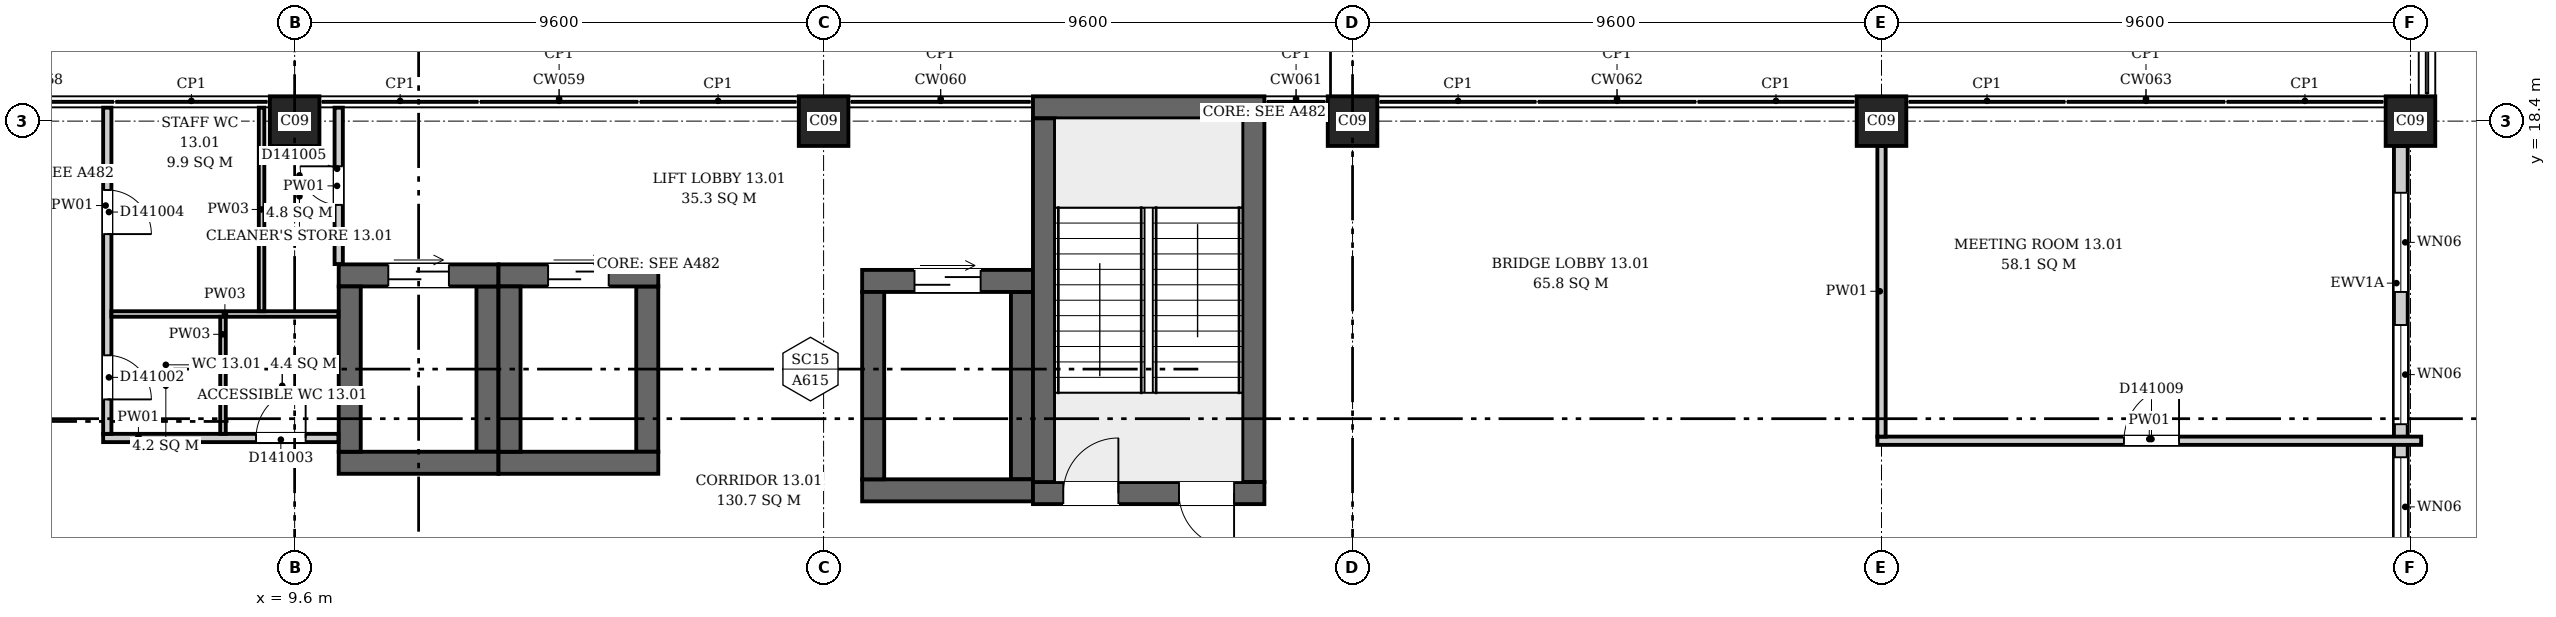
"""IFC4 building model, lengths in metres.
Left out: names, types, materials, properties, quantities, classifications, styles, units other than length and angle.
Written with IfcOpenShell. Run it as: python <this file> out.ifc"""

import sys

from ifc_helpers import new_model, si_unit, direction, frame, frame_2d, origin, origin_2d, place, context, subcontext, project, spatial, rectangle, extrude, element, fill, save


model = new_model("IFC4")
c1 = context("Model", 3, precision=1e-05, world=origin(), true_north=direction((0.0, 1.0)))
c2 = subcontext(c1, "Body", "Model", "MODEL_VIEW")
j1 = project(units=[si_unit("LENGTHUNIT", "METRE"), si_unit("PLANEANGLEUNIT", "RADIAN")], contexts=[c1])
p1 = place(None, origin())
s1 = spatial("IfcSite", under=j1, at=p1, CompositionType="ELEMENT")
p2 = place(p1, origin())
s2 = spatial("IfcBuilding", under=s1, at=p2, CompositionType="ELEMENT")
p3 = place(p2, frame((0.0, 0.0, 65.5)))
s3 = spatial("IfcBuildingStorey", under=s2, at=p3, CompositionType="ELEMENT", Elevation=65.5)
p4 = place(p3, frame((23.0, 11.65, 0.0), z_axis=(0.0, 0.0, 1.0), x_axis=(1.0, 0.0, 0.0)))
e1 = element("IfcWall", 1, at=p4, inside=s3, PredefinedType="SHEAR", context=c2, shape_type="SweptSolid", body=[
    extrude(rectangle(XDim=4.2, YDim=0.4, at=frame_2d((2.1, 0.0))), origin(), (0.0, 0.0, 1.0), 4.2),
])
p5 = place(p4, frame((0.55, 0.0, 0.0)))
e2 = element("IfcOpeningElement", 2, at=p5, cuts=e1, PredefinedType="OPENING", context=c2, shape_type="SweptSolid", body=[
    extrude(rectangle(XDim=1.0, YDim=2.1, at=frame_2d((0.5, 1.05))), frame((0.0, 0.21, 0.0), z_axis=(0.0, -1.0, 0.0), x_axis=(1.0, 0.0, 0.0)), (0.0, 0.0, 1.0), 0.42),
])
p6 = place(p4, frame((2.65, 0.0, 0.0)))
e3 = element("IfcOpeningElement", 3, at=p6, cuts=e1, PredefinedType="OPENING", context=c2, shape_type="SweptSolid", body=[
    extrude(rectangle(XDim=1.0, YDim=2.1, at=frame_2d((0.5, 1.05))), frame((0.0, 0.21, 0.0), z_axis=(0.0, -1.0, 0.0), x_axis=(1.0, 0.0, 0.0)), (0.0, 0.0, 1.0), 0.42),
])
p7 = place(p3, frame((23.0, 18.65, 0.0), z_axis=(0.0, 0.0, 1.0), x_axis=(1.0, 0.0, 0.0)))
e4 = element("IfcWall", 4, at=p7, inside=s3, PredefinedType="SHEAR", context=c2, shape_type="SweptSolid", body=[
    extrude(rectangle(XDim=4.2, YDim=0.4, at=frame_2d((2.1, 0.0))), origin(), (0.0, 0.0, 1.0), 4.2),
])
for number, where, z_axis, x_axis in (
    (5, (23.2, 11.85, 0.0), (0.0, 0.0, 1.0), (0.0, 1.0, 0.0)),
    (6, (27.0, 11.85, 0.0), (0.0, 0.0, 1.0), (0.0, 1.0, 0.0)),
):
    element("IfcWall", number, at=place(p3, frame(where, z_axis=z_axis, x_axis=x_axis)), inside=s3, PredefinedType="SHEAR", context=c2, shape_type="SweptSolid", body=[
        extrude(rectangle(XDim=6.6, YDim=0.4, at=frame_2d((3.3, 0.0))), origin(), (0.0, 0.0, 1.0), 4.2),
    ])
p8 = place(p3, frame((10.4, 12.2, 0.0), z_axis=(0.0, 0.0, 1.0), x_axis=(1.0, 0.0, 0.0)))
e7 = element("IfcWall", 7, at=p8, inside=s3, PredefinedType="SHEAR", context=c2, shape_type="SweptSolid", body=[
    extrude(rectangle(XDim=2.9, YDim=0.4, at=frame_2d((1.45, 0.0))), origin(), (0.0, 0.0, 1.0), 4.2),
])
p9 = place(p3, frame((10.4, 15.6, 0.0), z_axis=(0.0, 0.0, 1.0), x_axis=(1.0, 0.0, 0.0)))
e8 = element("IfcWall", 8, at=p9, inside=s3, PredefinedType="SHEAR", context=c2, shape_type="SweptSolid", body=[
    extrude(rectangle(XDim=2.9, YDim=0.4, at=frame_2d((1.45, 0.0))), origin(), (0.0, 0.0, 1.0), 4.2),
])
p10 = place(p9, frame((0.9, 0.0, 0.0)))
e9 = element("IfcOpeningElement", 9, at=p10, cuts=e8, PredefinedType="OPENING", context=c2, shape_type="SweptSolid", body=[
    extrude(rectangle(XDim=1.1, YDim=2.1, at=frame_2d((0.55, 1.05))), frame((0.0, 0.21, 0.0), z_axis=(0.0, -1.0, 0.0), x_axis=(1.0, 0.0, 0.0)), (0.0, 0.0, 1.0), 0.42),
])
for number, where, z_axis, x_axis in (
    (10, (10.6, 12.4, 0.0), (0.0, 0.0, 1.0), (0.0, 1.0, 0.0)),
    (11, (13.1, 12.4, 0.0), (0.0, 0.0, 1.0), (0.0, 1.0, 0.0)),
):
    element("IfcWall", number, at=place(p3, frame(where, z_axis=z_axis, x_axis=x_axis)), inside=s3, PredefinedType="SHEAR", context=c2, shape_type="SweptSolid", body=[
        extrude(rectangle(XDim=3.0, YDim=0.4, at=frame_2d((1.5, 0.0))), origin(), (0.0, 0.0, 1.0), 4.2),
    ])
p11 = place(p3, frame((13.3, 12.2, 0.0), z_axis=(0.0, 0.0, 1.0), x_axis=(1.0, 0.0, 0.0)))
e12 = element("IfcWall", 12, at=p11, inside=s3, PredefinedType="SHEAR", context=c2, shape_type="SweptSolid", body=[
    extrude(rectangle(XDim=2.9, YDim=0.4, at=frame_2d((1.45, 0.0))), origin(), (0.0, 0.0, 1.0), 4.2),
])
p12 = place(p3, frame((13.3, 15.6, 0.0), z_axis=(0.0, 0.0, 1.0), x_axis=(1.0, 0.0, 0.0)))
e13 = element("IfcWall", 13, at=p12, inside=s3, PredefinedType="SHEAR", context=c2, shape_type="SweptSolid", body=[
    extrude(rectangle(XDim=2.9, YDim=0.4, at=frame_2d((1.45, 0.0))), origin(), (0.0, 0.0, 1.0), 4.2),
])
p13 = place(p12, frame((0.9, 0.0, 0.0)))
e14 = element("IfcOpeningElement", 14, at=p13, cuts=e13, PredefinedType="OPENING", context=c2, shape_type="SweptSolid", body=[
    extrude(rectangle(XDim=1.1, YDim=2.1, at=frame_2d((0.55, 1.05))), frame((0.0, 0.21, 0.0), z_axis=(0.0, -1.0, 0.0), x_axis=(1.0, 0.0, 0.0)), (0.0, 0.0, 1.0), 0.42),
])
for number, where, z_axis, x_axis in (
    (15, (13.5, 12.4, 0.0), (0.0, 0.0, 1.0), (0.0, 1.0, 0.0)),
    (16, (16.0, 12.4, 0.0), (0.0, 0.0, 1.0), (0.0, 1.0, 0.0)),
):
    element("IfcWall", number, at=place(p3, frame(where, z_axis=z_axis, x_axis=x_axis)), inside=s3, PredefinedType="SHEAR", context=c2, shape_type="SweptSolid", body=[
        extrude(rectangle(XDim=3.0, YDim=0.4, at=frame_2d((1.5, 0.0))), origin(), (0.0, 0.0, 1.0), 4.2),
    ])
p14 = place(p3, frame((19.9, 11.7, 0.0), z_axis=(0.0, 0.0, 1.0), x_axis=(1.0, 0.0, 0.0)))
e17 = element("IfcWall", 17, at=p14, inside=s3, PredefinedType="SHEAR", context=c2, shape_type="SweptSolid", body=[
    extrude(rectangle(XDim=3.1, YDim=0.4, at=frame_2d((1.55, 0.0))), origin(), (0.0, 0.0, 1.0), 4.2),
])
p15 = place(p3, frame((19.9, 15.5, 0.0), z_axis=(0.0, 0.0, 1.0), x_axis=(1.0, 0.0, 0.0)))
e18 = element("IfcWall", 18, at=p15, inside=s3, PredefinedType="SHEAR", context=c2, shape_type="SweptSolid", body=[
    extrude(rectangle(XDim=3.1, YDim=0.4, at=frame_2d((1.55, 0.0))), origin(), (0.0, 0.0, 1.0), 4.2),
])
p16 = place(p15, frame((0.95, 0.0, 0.0)))
e19 = element("IfcOpeningElement", 19, at=p16, cuts=e18, PredefinedType="OPENING", context=c2, shape_type="SweptSolid", body=[
    extrude(rectangle(XDim=1.2, YDim=2.1, at=frame_2d((0.6, 1.05))), frame((0.0, 0.21, 0.0), z_axis=(0.0, -1.0, 0.0), x_axis=(1.0, 0.0, 0.0)), (0.0, 0.0, 1.0), 0.42),
])
for number, where, z_axis, x_axis in (
    (20, (20.1, 11.9, 0.0), (0.0, 0.0, 1.0), (0.0, 1.0, 0.0)),
    (21, (22.8, 11.9, 0.0), (0.0, 0.0, 1.0), (0.0, 1.0, 0.0)),
):
    element("IfcWall", number, at=place(p3, frame(where, z_axis=z_axis, x_axis=x_axis)), inside=s3, PredefinedType="SHEAR", context=c2, shape_type="SweptSolid", body=[
        extrude(rectangle(XDim=3.4, YDim=0.4, at=frame_2d((1.7, 0.0))), origin(), (0.0, 0.0, 1.0), 4.2),
    ])
for number, where, z_axis, x_axis in (
    (22, (9.6, 18.4, 0.0), (0.0, 0.0, 1.0), (1.0, 0.0, 0.0)),
    (23, (19.2, 18.4, 0.0), (0.0, 0.0, 1.0), (1.0, 0.0, 0.0)),
    (24, (28.8, 18.4, 0.0), (0.0, 0.0, 1.0), (1.0, 0.0, 0.0)),
    (25, (38.4, 18.4, 0.0), (0.0, 0.0, 1.0), (1.0, 0.0, 0.0)),
    (26, (48.0, 18.4, 0.0), (0.0, 0.0, 1.0), (1.0, 0.0, 0.0)),
):
    element("IfcColumn", number, at=place(p3, frame(where, z_axis=z_axis, x_axis=x_axis)), inside=s3, PredefinedType="COLUMN", context=c2, shape_type="SweptSolid", body=[
        extrude(rectangle(XDim=0.9, YDim=0.9, at=origin_2d()), origin(), (0.0, 0.0, 1.0), 4.2),
    ])
p17 = place(p3, frame((47.825, 9.65, 0.0), z_axis=(0.0, 0.0, 1.0), x_axis=(0.0, 1.0, 0.0)))
e27 = element("IfcWall", 27, at=p17, inside=s3, PredefinedType="ELEMENTEDWALL", context=c2, shape_type="SweptSolid", body=[
    extrude(rectangle(XDim=8.3, YDim=0.25, at=frame_2d((4.15, 0.0))), origin(), (0.0, 0.0, 1.0), 3.3),
])
p18 = place(p17, frame((0.85, 0.0, 0.6)))
e28 = element("IfcOpeningElement", 28, at=p18, cuts=e27, PredefinedType="OPENING", context=c2, shape_type="SweptSolid", body=[
    extrude(rectangle(XDim=1.8, YDim=2.6, at=frame_2d((0.9, 1.3))), frame((0.0, 0.135, 0.0), z_axis=(0.0, -1.0, 0.0), x_axis=(1.0, 0.0, 0.0)), (0.0, 0.0, 1.0), 0.27),
])
p19 = place(p17, frame((3.25, 0.0, 0.6)))
e29 = element("IfcOpeningElement", 29, at=p19, cuts=e27, PredefinedType="OPENING", context=c2, shape_type="SweptSolid", body=[
    extrude(rectangle(XDim=1.8, YDim=2.6, at=frame_2d((0.9, 1.3))), frame((0.0, 0.135, 0.0), z_axis=(0.0, -1.0, 0.0), x_axis=(1.0, 0.0, 0.0)), (0.0, 0.0, 1.0), 0.27),
])
p20 = place(p17, frame((5.65, 0.0, 0.6)))
e30 = element("IfcOpeningElement", 30, at=p20, cuts=e27, PredefinedType="OPENING", context=c2, shape_type="SweptSolid", body=[
    extrude(rectangle(XDim=1.8, YDim=2.6, at=frame_2d((0.9, 1.3))), frame((0.0, 0.135, 0.0), z_axis=(0.0, -1.0, 0.0), x_axis=(1.0, 0.0, 0.0)), (0.0, 0.0, 1.0), 0.27),
])
p21 = place(p3, frame((6.125, 12.65, 0.0), z_axis=(0.0, 0.0, 1.0), x_axis=(1.0, 0.0, 0.0)))
e31 = element("IfcWall", 31, at=p21, inside=s3, PredefinedType="PARTITIONING", context=c2, shape_type="SweptSolid", body=[
    extrude(rectangle(XDim=4.269, YDim=0.15, at=frame_2d((2.135, 0.0))), origin(), (0.0, 0.0, 1.0), 3.9),
])
p22 = place(p21, frame((2.775, 0.0, 0.0)))
e32 = element("IfcOpeningElement", 32, at=p22, cuts=e31, PredefinedType="OPENING", context=c2, shape_type="SweptSolid", body=[
    extrude(rectangle(XDim=0.9, YDim=2.1, at=frame_2d((0.45, 1.05))), frame((0.0, 0.085, 0.0), z_axis=(0.0, -1.0, 0.0), x_axis=(1.0, 0.0, 0.0)), (0.0, 0.0, 1.0), 0.17),
])
p23 = place(p3, frame((6.2, 12.725, 0.0), z_axis=(0.0, 0.0, 1.0), x_axis=(0.0, 1.0, 0.0)))
e33 = element("IfcWall", 33, at=p23, inside=s3, PredefinedType="PARTITIONING", context=c2, shape_type="SweptSolid", body=[
    extrude(rectangle(XDim=5.919, YDim=0.15, at=frame_2d((2.959, 0.0))), origin(), (0.0, 0.0, 1.0), 3.9),
])
p24 = place(p23, frame((0.625, 0.0, 0.0)))
e34 = element("IfcOpeningElement", 34, at=p24, cuts=e33, PredefinedType="OPENING", context=c2, shape_type="SweptSolid", body=[
    extrude(rectangle(XDim=0.8, YDim=2.1, at=frame_2d((0.4, 1.05))), frame((0.0, 0.085, 0.0), z_axis=(0.0, -1.0, 0.0), x_axis=(1.0, 0.0, 0.0)), (0.0, 0.0, 1.0), 0.17),
])
p25 = place(p23, frame((3.625, 0.0, 0.0)))
e35 = element("IfcOpeningElement", 35, at=p25, cuts=e33, PredefinedType="OPENING", context=c2, shape_type="SweptSolid", body=[
    extrude(rectangle(XDim=0.8, YDim=2.1, at=frame_2d((0.4, 1.05))), frame((0.0, 0.085, 0.0), z_axis=(0.0, -1.0, 0.0), x_axis=(1.0, 0.0, 0.0)), (0.0, 0.0, 1.0), 0.17),
])
p26 = place(p3, frame((6.275, 14.9, 0.0), z_axis=(0.0, 0.0, 1.0), x_axis=(1.0, 0.0, 0.0)))
e36 = element("IfcWall", 36, at=p26, inside=s3, PredefinedType="PARTITIONING", context=c2, shape_type="SweptSolid", body=[
    extrude(rectangle(XDim=4.119, YDim=0.1, at=frame_2d((2.06, 0.0))), origin(), (0.0, 0.0, 1.0), 3.9),
])
p27 = place(p3, frame((8.3, 12.725, 0.0), z_axis=(0.0, 0.0, 1.0), x_axis=(0.0, 1.0, 0.0)))
e37 = element("IfcWall", 37, at=p27, inside=s3, PredefinedType="PARTITIONING", context=c2, shape_type="SweptSolid", body=[
    extrude(rectangle(XDim=2.125, YDim=0.1, at=frame_2d((1.062, 0.0))), origin(), (0.0, 0.0, 1.0), 3.9),
])
p28 = place(p3, frame((9.0, 14.95, 0.0), z_axis=(0.0, 0.0, 1.0), x_axis=(0.0, 1.0, 0.0)))
e38 = element("IfcWall", 38, at=p28, inside=s3, PredefinedType="PARTITIONING", context=c2, shape_type="SweptSolid", body=[
    extrude(rectangle(XDim=3.694, YDim=0.1, at=frame_2d((1.847, 0.0))), origin(), (0.0, 0.0, 1.0), 3.9),
])
p29 = place(p3, frame((10.4, 15.806, 0.0), z_axis=(0.0, 0.0, 1.0), x_axis=(0.0, 1.0, 0.0)))
e39 = element("IfcWall", 39, at=p29, inside=s3, PredefinedType="PARTITIONING", context=c2, shape_type="SweptSolid", body=[
    extrude(rectangle(XDim=2.838, YDim=0.15, at=frame_2d((1.419, 0.0))), origin(), (0.0, 0.0, 1.0), 3.9),
])
p30 = place(p29, frame((1.074, 0.0, 0.0)))
e40 = element("IfcOpeningElement", 40, at=p30, cuts=e39, PredefinedType="OPENING", context=c2, shape_type="SweptSolid", body=[
    extrude(rectangle(XDim=0.7, YDim=2.1, at=frame_2d((0.35, 1.05))), frame((0.0, 0.085, 0.0), z_axis=(0.0, -1.0, 0.0), x_axis=(1.0, 0.0, 0.0)), (0.0, 0.0, 1.0), 0.17),
])
p31 = place(p3, frame((38.325, 12.6, 0.0), z_axis=(0.0, 0.0, 1.0), x_axis=(1.0, 0.0, 0.0)))
e41 = element("IfcWall", 41, at=p31, inside=s3, PredefinedType="PARTITIONING", context=c2, shape_type="SweptSolid", body=[
    extrude(rectangle(XDim=9.869, YDim=0.15, at=frame_2d((4.935, 0.0))), origin(), (0.0, 0.0, 1.0), 3.9),
])
p32 = place(p31, frame((4.475, 0.0, 0.0)))
e42 = element("IfcOpeningElement", 42, at=p32, cuts=e41, PredefinedType="OPENING", context=c2, shape_type="SweptSolid", body=[
    extrude(rectangle(XDim=1.0, YDim=2.1, at=frame_2d((0.5, 1.05))), frame((0.0, 0.085, 0.0), z_axis=(0.0, -1.0, 0.0), x_axis=(1.0, 0.0, 0.0)), (0.0, 0.0, 1.0), 0.17),
])
p33 = place(p3, frame((38.4, 12.675, 0.0), z_axis=(0.0, 0.0, 1.0), x_axis=(0.0, 1.0, 0.0)))
e43 = element("IfcWall", 43, at=p33, inside=s3, PredefinedType="PARTITIONING", context=c2, shape_type="SweptSolid", body=[
    extrude(rectangle(XDim=5.275, YDim=0.15, at=frame_2d((2.637, 0.0))), origin(), (0.0, 0.0, 1.0), 3.9),
])
p34 = place(p18, origin())
e44 = element("IfcWindow", 44, at=p34, inside=s3, PartitioningType="SINGLE_PANEL", PredefinedType="WINDOW", context=c2, shape_type="SweptSolid", body=[
    extrude(rectangle(XDim=1.8, YDim=2.6, at=frame_2d((0.9, 1.3))), frame((0.0, 0.03, 0.0), z_axis=(0.0, -1.0, 0.0), x_axis=(1.0, 0.0, 0.0)), (0.0, 0.0, 1.0), 0.06),
])
fill(e28, e44)
p35 = place(p19, origin())
e45 = element("IfcWindow", 45, at=p35, inside=s3, PartitioningType="SINGLE_PANEL", PredefinedType="WINDOW", context=c2, shape_type="SweptSolid", body=[
    extrude(rectangle(XDim=1.8, YDim=2.6, at=frame_2d((0.9, 1.3))), frame((0.0, 0.03, 0.0), z_axis=(0.0, -1.0, 0.0), x_axis=(1.0, 0.0, 0.0)), (0.0, 0.0, 1.0), 0.06),
])
fill(e29, e45)
p36 = place(p20, origin())
e46 = element("IfcWindow", 46, at=p36, inside=s3, PartitioningType="SINGLE_PANEL", PredefinedType="WINDOW", context=c2, shape_type="SweptSolid", body=[
    extrude(rectangle(XDim=1.8, YDim=2.6, at=frame_2d((0.9, 1.3))), frame((0.0, 0.03, 0.0), z_axis=(0.0, -1.0, 0.0), x_axis=(1.0, 0.0, 0.0)), (0.0, 0.0, 1.0), 0.06),
])
fill(e30, e46)
p37 = place(p5, origin())
e47 = element("IfcDoor", 47, at=p37, inside=s3, OperationType="SINGLE_SWING_RIGHT", PredefinedType="DOOR", context=c2, shape_type="SweptSolid", body=[
    extrude(rectangle(XDim=1.0, YDim=2.1, at=frame_2d((0.5, 1.05))), frame((0.0, 0.025, 0.0), z_axis=(0.0, -1.0, 0.0), x_axis=(1.0, 0.0, 0.0)), (0.0, 0.0, 1.0), 0.05),
])
fill(e2, e47)
p38 = place(p6, origin())
e48 = element("IfcDoor", 48, at=p38, inside=s3, OperationType="SINGLE_SWING_LEFT", PredefinedType="DOOR", context=c2, shape_type="SweptSolid", body=[
    extrude(rectangle(XDim=1.0, YDim=2.1, at=frame_2d((0.5, 1.05))), frame((0.0, 0.025, 0.0), z_axis=(0.0, -1.0, 0.0), x_axis=(1.0, 0.0, 0.0)), (0.0, 0.0, 1.0), 0.05),
])
fill(e3, e48)
p39 = place(p10, origin())
e49 = element("IfcDoor", 49, at=p39, inside=s3, OperationType="DOUBLE_DOOR_SLIDING", PredefinedType="DOOR", context=c2, shape_type="SweptSolid", body=[
    extrude(rectangle(XDim=1.1, YDim=2.1, at=frame_2d((0.55, 1.05))), frame((0.0, 0.025, 0.0), z_axis=(0.0, -1.0, 0.0), x_axis=(1.0, 0.0, 0.0)), (0.0, 0.0, 1.0), 0.05),
])
fill(e9, e49)
p40 = place(p13, origin())
e50 = element("IfcDoor", 50, at=p40, inside=s3, OperationType="DOUBLE_DOOR_SLIDING", PredefinedType="DOOR", context=c2, shape_type="SweptSolid", body=[
    extrude(rectangle(XDim=1.1, YDim=2.1, at=frame_2d((0.55, 1.05))), frame((0.0, 0.025, 0.0), z_axis=(0.0, -1.0, 0.0), x_axis=(1.0, 0.0, 0.0)), (0.0, 0.0, 1.0), 0.05),
])
fill(e14, e50)
p41 = place(p16, origin())
e51 = element("IfcDoor", 51, at=p41, inside=s3, OperationType="DOUBLE_DOOR_SLIDING", PredefinedType="DOOR", context=c2, shape_type="SweptSolid", body=[
    extrude(rectangle(XDim=1.2, YDim=2.1, at=frame_2d((0.6, 1.05))), frame((0.0, 0.025, 0.0), z_axis=(0.0, -1.0, 0.0), x_axis=(1.0, 0.0, 0.0)), (0.0, 0.0, 1.0), 0.05),
])
fill(e19, e51)
p42 = place(p24, origin())
e52 = element("IfcDoor", 52, at=p42, inside=s3, OperationType="SINGLE_SWING_LEFT", PredefinedType="DOOR", context=c2, shape_type="SweptSolid", body=[
    extrude(rectangle(XDim=0.8, YDim=2.1, at=frame_2d((0.4, 1.05))), frame((0.0, 0.025, 0.0), z_axis=(0.0, -1.0, 0.0), x_axis=(1.0, 0.0, 0.0)), (0.0, 0.0, 1.0), 0.05),
])
fill(e34, e52)
p43 = place(p22, origin())
e53 = element("IfcDoor", 53, at=p43, inside=s3, OperationType="SINGLE_SWING_RIGHT", PredefinedType="DOOR", context=c2, shape_type="SweptSolid", body=[
    extrude(rectangle(XDim=0.9, YDim=2.1, at=frame_2d((0.45, 1.05))), frame((0.0, 0.025, 0.0), z_axis=(0.0, -1.0, 0.0), x_axis=(1.0, 0.0, 0.0)), (0.0, 0.0, 1.0), 0.05),
])
fill(e32, e53)
p44 = place(p25, origin())
e54 = element("IfcDoor", 54, at=p44, inside=s3, OperationType="SINGLE_SWING_LEFT", PredefinedType="DOOR", context=c2, shape_type="SweptSolid", body=[
    extrude(rectangle(XDim=0.8, YDim=2.1, at=frame_2d((0.4, 1.05))), frame((0.0, 0.025, 0.0), z_axis=(0.0, -1.0, 0.0), x_axis=(1.0, 0.0, 0.0)), (0.0, 0.0, 1.0), 0.05),
])
fill(e35, e54)
p45 = place(p30, origin())
e55 = element("IfcDoor", 55, at=p45, inside=s3, OperationType="SINGLE_SWING_LEFT", PredefinedType="DOOR", context=c2, shape_type="SweptSolid", body=[
    extrude(rectangle(XDim=0.7, YDim=2.1, at=frame_2d((0.35, 1.05))), frame((0.0, 0.025, 0.0), z_axis=(0.0, -1.0, 0.0), x_axis=(1.0, 0.0, 0.0)), (0.0, 0.0, 1.0), 0.05),
])
fill(e40, e55)
p46 = place(p32, origin())
e56 = element("IfcDoor", 56, at=p46, inside=s3, OperationType="SINGLE_SWING_RIGHT", PredefinedType="DOOR", context=c2, shape_type="SweptSolid", body=[
    extrude(rectangle(XDim=1.0, YDim=2.1, at=frame_2d((0.5, 1.05))), frame((0.0, 0.025, 0.0), z_axis=(0.0, -1.0, 0.0), x_axis=(1.0, 0.0, 0.0)), (0.0, 0.0, 1.0), 0.05),
])
fill(e42, e56)
save(model, sys.argv[1])
